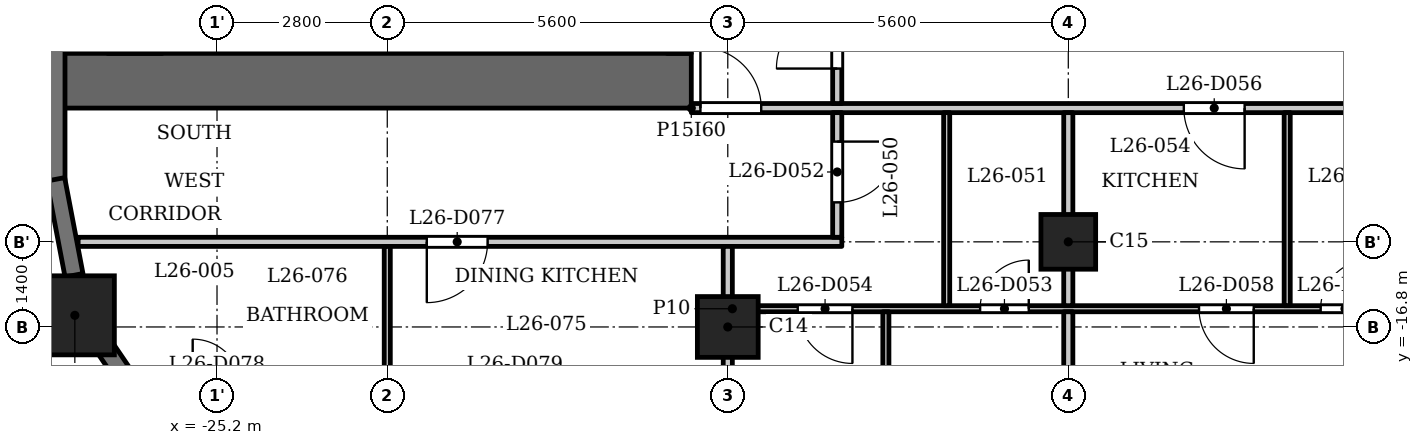
"""IFC4 building model, lengths in metres.
Left out: names, types, materials, properties, quantities, classifications, styles, units other than length and angle.
Written with IfcOpenShell. Run it as: python <this file> out.ifc"""

import sys

from ifc_helpers import new_model, si_unit, direction, frame, frame_2d, origin, origin_2d, place, context, subcontext, project, spatial, rectangle, extrude, element, fill, save


model = new_model("IFC4")
c1 = context("Model", 3, precision=1e-05, world=origin(), true_north=direction((0.0, 1.0)))
c2 = subcontext(c1, "Body", "Model", "MODEL_VIEW")
j1 = project(units=[si_unit("LENGTHUNIT", "METRE"), si_unit("PLANEANGLEUNIT", "RADIAN")], contexts=[c1])
p1 = place(None, origin())
s1 = spatial("IfcSite", under=j1, at=p1, CompositionType="ELEMENT")
p2 = place(p1, origin())
s2 = spatial("IfcBuilding", under=s1, at=p2, CompositionType="ELEMENT")
p3 = place(p2, frame((0.0, 0.0, 104.3)))
s3 = spatial("IfcBuildingStorey", under=s2, at=p3, CompositionType="ELEMENT", Elevation=104.3)
p4 = place(p3, frame((-27.538, -16.609, 0.0), z_axis=(0.0, 0.0, 1.0), x_axis=(1.0, 0.0, 0.0)))
e1 = element("IfcColumn", 1, at=p4, inside=s3, PredefinedType="COLUMN", context=c2, shape_type="SweptSolid", body=[
    extrude(rectangle(XDim=1.3, YDim=1.3, at=origin_2d()), origin(), (0.0, 0.0, 1.0), 3.5),
])
p5 = place(p3, frame((-16.8, -16.8, 0.0), z_axis=(0.0, 0.0, 1.0), x_axis=(1.0, 0.0, 0.0)))
e2 = element("IfcColumn", 2, at=p5, inside=s3, PredefinedType="COLUMN", context=c2, shape_type="SweptSolid", body=[
    extrude(rectangle(XDim=1.0, YDim=1.0, at=origin_2d()), origin(), (0.0, 0.0, 1.0), 3.5),
])
p6 = place(p3, frame((-11.2, -15.4, 0.0), z_axis=(0.0, 0.0, 1.0), x_axis=(1.0, 0.0, 0.0)))
e3 = element("IfcColumn", 3, at=p6, inside=s3, PredefinedType="COLUMN", context=c2, shape_type="SweptSolid", body=[
    extrude(rectangle(XDim=0.9, YDim=0.9, at=origin_2d()), origin(), (0.0, 0.0, 1.0), 3.5),
])
p7 = place(p3, frame((-27.85, -11.85, 0.0), z_axis=(0.0, 0.0, 1.0), x_axis=(0.0, -1.0, 0.0)))
e4 = element("IfcWall", 4, at=p7, inside=s3, PredefinedType="SOLIDWALL", context=c2, shape_type="SweptSolid", body=[
    extrude(rectangle(XDim=2.55, YDim=0.3, at=frame_2d((1.275, 0.0))), origin(), (0.0, 0.0, 1.0), 2.4),
])
for number, where, z_axis, x_axis in (
    (5, (-27.853, -14.372, 0.0), (0.0, 0.0, 1.0), (0.187, -0.982, 0.0)),
    (6, (-27.082, -17.084, 0.0), (0.0, 0.0, 1.0), (0.562, -0.827, 0.0)),
):
    element("IfcWall", number, at=place(p3, frame(where, z_axis=z_axis, x_axis=x_axis)), inside=s3, PredefinedType="SOLIDWALL", context=c2, shape_type="SweptSolid", body=[
        extrude(rectangle(XDim=1.606, YDim=0.3, at=frame_2d((0.803, 0.0))), origin(), (0.0, 0.0, 1.0), 2.4),
    ])
p8 = place(p3, frame((-17.4, -12.75, 0.0), z_axis=(0.0, 0.0, 1.0), x_axis=(-1.0, 0.0, 0.0)))
e7 = element("IfcWall", 7, at=p8, inside=s3, PredefinedType="SHEAR", context=c2, shape_type="SweptSolid", body=[
    extrude(rectangle(XDim=10.4, YDim=0.9, at=frame_2d((5.2, 0.0))), origin(), (0.0, 0.0, 1.0), 3.2),
])
p9 = place(p3, frame((-17.6, -12.3, 0.0), z_axis=(0.0, 0.0, 1.0), x_axis=(0.0, 1.0, 0.0)))
e8 = element("IfcWall", 8, at=p9, inside=s3, PredefinedType="SHEAR", context=c2, shape_type="SweptSolid", body=[
    extrude(rectangle(XDim=24.6, YDim=0.4, at=frame_2d((12.3, 0.0))), origin(), (0.0, 0.0, 1.0), 3.2),
])
p10 = place(p9, frame((6.0, 0.0, 0.0)))
e9 = element("IfcOpeningElement", 9, at=p10, cuts=e8, PredefinedType="OPENING", context=c2, shape_type="SweptSolid", body=[
    extrude(rectangle(XDim=1.1, YDim=2.1, at=frame_2d((0.55, 1.05))), frame((0.0, 0.21, 0.0), z_axis=(0.0, -1.0, 0.0), x_axis=(1.0, 0.0, 0.0)), (0.0, 0.0, 1.0), 0.42),
])
p11 = place(p9, frame((8.4, 0.0, 0.0)))
e10 = element("IfcOpeningElement", 10, at=p11, cuts=e8, PredefinedType="OPENING", context=c2, shape_type="SweptSolid", body=[
    extrude(rectangle(XDim=1.1, YDim=2.1, at=frame_2d((0.55, 1.05))), frame((0.0, 0.21, 0.0), z_axis=(0.0, -1.0, 0.0), x_axis=(1.0, 0.0, 0.0)), (0.0, 0.0, 1.0), 0.42),
])
p12 = place(p9, frame((10.8, 0.0, 0.0)))
e11 = element("IfcOpeningElement", 11, at=p12, cuts=e8, PredefinedType="OPENING", context=c2, shape_type="SweptSolid", body=[
    extrude(rectangle(XDim=1.1, YDim=2.1, at=frame_2d((0.55, 1.05))), frame((0.0, 0.21, 0.0), z_axis=(0.0, -1.0, 0.0), x_axis=(1.0, 0.0, 0.0)), (0.0, 0.0, 1.0), 0.42),
])
p13 = place(p9, frame((16.75, 0.0, 0.0)))
e12 = element("IfcOpeningElement", 12, at=p13, cuts=e8, PredefinedType="OPENING", context=c2, shape_type="SweptSolid", body=[
    extrude(rectangle(XDim=0.9, YDim=2.1, at=frame_2d((0.45, 1.05))), frame((0.0, 0.21, 0.0), z_axis=(0.0, -1.0, 0.0), x_axis=(1.0, 0.0, 0.0)), (0.0, 0.0, 1.0), 0.42),
])
p14 = place(p9, frame((22.8, 0.0, 0.0)))
e13 = element("IfcOpeningElement", 13, at=p14, cuts=e8, PredefinedType="OPENING", context=c2, shape_type="SweptSolid", body=[
    extrude(rectangle(XDim=1.1, YDim=2.1, at=frame_2d((0.55, 1.05))), frame((0.0, 0.21, 0.0), z_axis=(0.0, -1.0, 0.0), x_axis=(1.0, 0.0, 0.0)), (0.0, 0.0, 1.0), 0.42),
])
p15 = place(p9, frame((0.7, 0.0, 0.0)))
e14 = element("IfcOpeningElement", 14, at=p15, cuts=e8, PredefinedType="OPENING", context=c2, shape_type="SweptSolid", body=[
    extrude(rectangle(XDim=1.1, YDim=2.1, at=frame_2d((0.55, 1.05))), frame((0.0, 0.21, 0.0), z_axis=(0.0, -1.0, 0.0), x_axis=(1.0, 0.0, 0.0)), (0.0, 0.0, 1.0), 0.42),
])
p16 = place(p9, frame((12.775, 0.0, 0.0)))
e15 = element("IfcOpeningElement", 15, at=p16, cuts=e8, PredefinedType="OPENING", context=c2, shape_type="SweptSolid", body=[
    extrude(rectangle(XDim=1.8, YDim=2.1, at=frame_2d((0.9, 1.05))), frame((0.0, 0.21, 0.0), z_axis=(0.0, -1.0, 0.0), x_axis=(1.0, 0.0, 0.0)), (0.0, 0.0, 1.0), 0.42),
])
p17 = place(p3, frame((-26.55, -12.3, 0.0), z_axis=(0.0, 0.0, 1.0), x_axis=(0.0, 1.0, 0.0)))
e16 = element("IfcWall", 16, at=p17, inside=s3, PredefinedType="SHEAR", context=c2, shape_type="SweptSolid", body=[
    extrude(rectangle(XDim=24.6, YDim=0.9, at=frame_2d((12.3, 0.0))), origin(), (0.0, 0.0, 1.0), 3.2),
])
p18 = place(p3, frame((-23.55, -12.3, 0.0), z_axis=(0.0, 0.0, 1.0), x_axis=(0.0, 1.0, 0.0)))
e17 = element("IfcWall", 17, at=p18, inside=s3, PredefinedType="PARTITIONING", context=c2, shape_type="SweptSolid", body=[
    extrude(rectangle(XDim=2.5, YDim=0.2, at=frame_2d((1.25, 0.0))), origin(), (0.0, 0.0, 1.0), 3.2),
])
p19 = place(p18, frame((0.8, 0.0, 0.0)))
e18 = element("IfcOpeningElement", 18, at=p19, cuts=e17, PredefinedType="OPENING", context=c2, shape_type="SweptSolid", body=[
    extrude(rectangle(XDim=0.9, YDim=2.1, at=frame_2d((0.45, 1.05))), frame((0.0, 0.11, 0.0), z_axis=(0.0, -1.0, 0.0), x_axis=(1.0, 0.0, 0.0)), (0.0, 0.0, 1.0), 0.22),
])
p20 = place(p3, frame((-16.725, -16.5, 0.0), z_axis=(0.0, 0.0, 1.0), x_axis=(1.0, 0.0, 0.0)))
e19 = element("IfcWall", 19, at=p20, inside=s3, PredefinedType="PARTITIONING", context=c2, shape_type="SweptSolid", body=[
    extrude(rectangle(XDim=33.45, YDim=0.1, at=frame_2d((16.725, 0.0))), origin(), (0.0, 0.0, 1.0), 3.2),
])
p21 = place(p20, frame((4.075, 0.0, 0.0)))
e20 = element("IfcOpeningElement", 20, at=p21, cuts=e19, PredefinedType="OPENING", context=c2, shape_type="SweptSolid", body=[
    extrude(rectangle(XDim=0.8, YDim=2.1, at=frame_2d((0.4, 1.05))), frame((0.0, 0.06, 0.0), z_axis=(0.0, -1.0, 0.0), x_axis=(1.0, 0.0, 0.0)), (0.0, 0.0, 1.0), 0.12),
])
p22 = place(p20, frame((1.075, 0.0, 0.0)))
e21 = element("IfcOpeningElement", 21, at=p22, cuts=e19, PredefinedType="OPENING", context=c2, shape_type="SweptSolid", body=[
    extrude(rectangle(XDim=0.9, YDim=2.1, at=frame_2d((0.45, 1.05))), frame((0.0, 0.06, 0.0), z_axis=(0.0, -1.0, 0.0), x_axis=(1.0, 0.0, 0.0)), (0.0, 0.0, 1.0), 0.12),
])
p23 = place(p20, frame((9.675, 0.0, 0.0)))
e22 = element("IfcOpeningElement", 22, at=p23, cuts=e19, PredefinedType="OPENING", context=c2, shape_type="SweptSolid", body=[
    extrude(rectangle(XDim=0.8, YDim=2.1, at=frame_2d((0.4, 1.05))), frame((0.0, 0.06, 0.0), z_axis=(0.0, -1.0, 0.0), x_axis=(1.0, 0.0, 0.0)), (0.0, 0.0, 1.0), 0.12),
])
p24 = place(p20, frame((7.675, 0.0, 0.0)))
e23 = element("IfcOpeningElement", 23, at=p24, cuts=e19, PredefinedType="OPENING", context=c2, shape_type="SweptSolid", body=[
    extrude(rectangle(XDim=0.9, YDim=2.1, at=frame_2d((0.45, 1.05))), frame((0.0, 0.06, 0.0), z_axis=(0.0, -1.0, 0.0), x_axis=(1.0, 0.0, 0.0)), (0.0, 0.0, 1.0), 0.12),
])
p25 = place(p20, frame((15.275, 0.0, 0.0)))
e24 = element("IfcOpeningElement", 24, at=p25, cuts=e19, PredefinedType="OPENING", context=c2, shape_type="SweptSolid", body=[
    extrude(rectangle(XDim=0.8, YDim=2.1, at=frame_2d((0.4, 1.05))), frame((0.0, 0.06, 0.0), z_axis=(0.0, -1.0, 0.0), x_axis=(1.0, 0.0, 0.0)), (0.0, 0.0, 1.0), 0.12),
])
p26 = place(p20, frame((11.775, 0.0, 0.0)))
e25 = element("IfcOpeningElement", 25, at=p26, cuts=e19, PredefinedType="OPENING", context=c2, shape_type="SweptSolid", body=[
    extrude(rectangle(XDim=0.9, YDim=2.1, at=frame_2d((0.45, 1.05))), frame((0.0, 0.06, 0.0), z_axis=(0.0, -1.0, 0.0), x_axis=(1.0, 0.0, 0.0)), (0.0, 0.0, 1.0), 0.12),
])
p27 = place(p20, frame((20.625, 0.0, 0.0)))
e26 = element("IfcOpeningElement", 26, at=p27, cuts=e19, PredefinedType="OPENING", context=c2, shape_type="SweptSolid", body=[
    extrude(rectangle(XDim=0.8, YDim=2.1, at=frame_2d((0.4, 1.05))), frame((0.0, 0.06, 0.0), z_axis=(0.0, -1.0, 0.0), x_axis=(1.0, 0.0, 0.0)), (0.0, 0.0, 1.0), 0.12),
])
p28 = place(p20, frame((18.375, 0.0, 0.0)))
e27 = element("IfcOpeningElement", 27, at=p28, cuts=e19, PredefinedType="OPENING", context=c2, shape_type="SweptSolid", body=[
    extrude(rectangle(XDim=0.9, YDim=2.1, at=frame_2d((0.45, 1.05))), frame((0.0, 0.06, 0.0), z_axis=(0.0, -1.0, 0.0), x_axis=(1.0, 0.0, 0.0)), (0.0, 0.0, 1.0), 0.12),
])
p29 = place(p20, frame((26.475, 0.0, 0.0)))
e28 = element("IfcOpeningElement", 28, at=p29, cuts=e19, PredefinedType="OPENING", context=c2, shape_type="SweptSolid", body=[
    extrude(rectangle(XDim=0.8, YDim=2.1, at=frame_2d((0.4, 1.05))), frame((0.0, 0.06, 0.0), z_axis=(0.0, -1.0, 0.0), x_axis=(1.0, 0.0, 0.0)), (0.0, 0.0, 1.0), 0.12),
])
p30 = place(p20, frame((23.225, 0.0, 0.0)))
e29 = element("IfcOpeningElement", 29, at=p30, cuts=e19, PredefinedType="OPENING", context=c2, shape_type="SweptSolid", body=[
    extrude(rectangle(XDim=0.9, YDim=2.1, at=frame_2d((0.45, 1.05))), frame((0.0, 0.06, 0.0), z_axis=(0.0, -1.0, 0.0), x_axis=(1.0, 0.0, 0.0)), (0.0, 0.0, 1.0), 0.12),
])
p31 = place(p20, frame((29.475, 0.0, 0.0)))
e30 = element("IfcOpeningElement", 30, at=p31, cuts=e19, PredefinedType="OPENING", context=c2, shape_type="SweptSolid", body=[
    extrude(rectangle(XDim=0.8, YDim=2.1, at=frame_2d((0.4, 1.05))), frame((0.0, 0.06, 0.0), z_axis=(0.0, -1.0, 0.0), x_axis=(1.0, 0.0, 0.0)), (0.0, 0.0, 1.0), 0.12),
])
p32 = place(p20, frame((31.825, 0.0, 0.0)))
e31 = element("IfcOpeningElement", 31, at=p32, cuts=e19, PredefinedType="OPENING", context=c2, shape_type="SweptSolid", body=[
    extrude(rectangle(XDim=0.9, YDim=2.1, at=frame_2d((0.45, 1.05))), frame((0.0, 0.06, 0.0), z_axis=(0.0, -1.0, 0.0), x_axis=(1.0, 0.0, 0.0)), (0.0, 0.0, 1.0), 0.12),
])
p33 = place(p3, frame((-27.484, -15.4, 0.0), z_axis=(0.0, 0.0, 1.0), x_axis=(1.0, 0.0, 0.0)))
e32 = element("IfcWall", 32, at=p33, inside=s3, PredefinedType="PARTITIONING", context=c2, shape_type="SweptSolid", body=[
    extrude(rectangle(XDim=12.559, YDim=0.15, at=frame_2d((6.279, 0.0))), origin(), (0.0, 0.0, 1.0), 3.2),
])
p34 = place(p33, frame((5.734, 0.0, 0.0)))
e33 = element("IfcOpeningElement", 33, at=p34, cuts=e32, PredefinedType="OPENING", context=c2, shape_type="SweptSolid", body=[
    extrude(rectangle(XDim=1.0, YDim=2.1, at=frame_2d((0.5, 1.05))), frame((0.0, 0.085, 0.0), z_axis=(0.0, -1.0, 0.0), x_axis=(1.0, 0.0, 0.0)), (0.0, 0.0, 1.0), 0.17),
])
p35 = place(p3, frame((-17.4, -13.2, 0.0), z_axis=(0.0, 0.0, 1.0), x_axis=(1.0, 0.0, 0.0)))
e34 = element("IfcWall", 34, at=p35, inside=s3, PredefinedType="PARTITIONING", context=c2, shape_type="SweptSolid", body=[
    extrude(rectangle(XDim=34.8, YDim=0.15, at=frame_2d((17.4, 0.0))), origin(), (0.0, 0.0, 1.0), 3.2),
])
p36 = place(p35, frame((0.15, 0.0, 0.0)))
e35 = element("IfcOpeningElement", 35, at=p36, cuts=e34, PredefinedType="OPENING", context=c2, shape_type="SweptSolid", body=[
    extrude(rectangle(XDim=1.0, YDim=2.1, at=frame_2d((0.5, 1.05))), frame((0.0, 0.085, 0.0), z_axis=(0.0, -1.0, 0.0), x_axis=(1.0, 0.0, 0.0)), (0.0, 0.0, 1.0), 0.17),
])
p37 = place(p35, frame((33.55, 0.0, 0.0)))
e36 = element("IfcOpeningElement", 36, at=p37, cuts=e34, PredefinedType="OPENING", context=c2, shape_type="SweptSolid", body=[
    extrude(rectangle(XDim=1.0, YDim=2.1, at=frame_2d((0.5, 1.05))), frame((0.0, 0.085, 0.0), z_axis=(0.0, -1.0, 0.0), x_axis=(1.0, 0.0, 0.0)), (0.0, 0.0, 1.0), 0.17),
])
p38 = place(p35, frame((8.1, 0.0, 0.0)))
e37 = element("IfcOpeningElement", 37, at=p38, cuts=e34, PredefinedType="OPENING", context=c2, shape_type="SweptSolid", body=[
    extrude(rectangle(XDim=1.0, YDim=2.1, at=frame_2d((0.5, 1.05))), frame((0.0, 0.085, 0.0), z_axis=(0.0, -1.0, 0.0), x_axis=(1.0, 0.0, 0.0)), (0.0, 0.0, 1.0), 0.17),
])
p39 = place(p35, frame((12.45, 0.0, 0.0)))
e38 = element("IfcOpeningElement", 38, at=p39, cuts=e34, PredefinedType="OPENING", context=c2, shape_type="SweptSolid", body=[
    extrude(rectangle(XDim=1.0, YDim=2.1, at=frame_2d((0.5, 1.05))), frame((0.0, 0.085, 0.0), z_axis=(0.0, -1.0, 0.0), x_axis=(1.0, 0.0, 0.0)), (0.0, 0.0, 1.0), 0.17),
])
p40 = place(p35, frame((19.05, 0.0, 0.0)))
e39 = element("IfcOpeningElement", 39, at=p40, cuts=e34, PredefinedType="OPENING", context=c2, shape_type="SweptSolid", body=[
    extrude(rectangle(XDim=1.0, YDim=2.1, at=frame_2d((0.5, 1.05))), frame((0.0, 0.085, 0.0), z_axis=(0.0, -1.0, 0.0), x_axis=(1.0, 0.0, 0.0)), (0.0, 0.0, 1.0), 0.17),
])
p41 = place(p35, frame((24.9, 0.0, 0.0)))
e40 = element("IfcOpeningElement", 40, at=p41, cuts=e34, PredefinedType="OPENING", context=c2, shape_type="SweptSolid", body=[
    extrude(rectangle(XDim=1.0, YDim=2.1, at=frame_2d((0.5, 1.05))), frame((0.0, 0.085, 0.0), z_axis=(0.0, -1.0, 0.0), x_axis=(1.0, 0.0, 0.0)), (0.0, 0.0, 1.0), 0.17),
])
p42 = place(p3, frame((-22.4, -17.75, 0.0), z_axis=(0.0, 0.0, 1.0), x_axis=(0.0, 1.0, 0.0)))
e41 = element("IfcWall", 41, at=p42, inside=s3, PredefinedType="PARTITIONING", context=c2, shape_type="SweptSolid", body=[
    extrude(rectangle(XDim=2.275, YDim=0.1, at=frame_2d((1.137, 0.0))), origin(), (0.0, 0.0, 1.0), 3.2),
])
p43 = place(p3, frame((-16.8, -23.03, 0.0), z_axis=(0.0, 0.0, 1.0), x_axis=(0.0, 1.0, 0.0)))
e42 = element("IfcWall", 42, at=p43, inside=s3, PredefinedType="PARTITIONING", context=c2, shape_type="SweptSolid", body=[
    extrude(rectangle(XDim=7.555, YDim=0.15, at=frame_2d((3.777, 0.0))), origin(), (0.0, 0.0, 1.0), 3.2),
])
p44 = place(p3, frame((-15.0, -15.325, 0.0), z_axis=(0.0, 0.0, 1.0), x_axis=(0.0, 1.0, 0.0)))
e43 = element("IfcWall", 43, at=p44, inside=s3, PredefinedType="PARTITIONING", context=c2, shape_type="SweptSolid", body=[
    extrude(rectangle(XDim=2.05, YDim=0.15, at=frame_2d((1.025, 0.0))), origin(), (0.0, 0.0, 1.0), 3.2),
])
p45 = place(p44, frame((0.574, 0.0, 0.0)))
e44 = element("IfcOpeningElement", 44, at=p45, cuts=e43, PredefinedType="OPENING", context=c2, shape_type="SweptSolid", body=[
    extrude(rectangle(XDim=1.0, YDim=2.1, at=frame_2d((0.5, 1.05))), frame((0.0, 0.085, 0.0), z_axis=(0.0, -1.0, 0.0), x_axis=(1.0, 0.0, 0.0)), (0.0, 0.0, 1.0), 0.17),
])
p46 = place(p3, frame((-15.0, -13.125, 0.0), z_axis=(0.0, 0.0, 1.0), x_axis=(0.0, 1.0, 0.0)))
e45 = element("IfcWall", 45, at=p46, inside=s3, PredefinedType="PARTITIONING", context=c2, shape_type="SweptSolid", body=[
    extrude(rectangle(XDim=6.356, YDim=0.15, at=frame_2d((3.178, 0.0))), origin(), (0.0, 0.0, 1.0), 3.2),
])
p47 = place(p46, frame((0.575, 0.0, 0.0)))
e46 = element("IfcOpeningElement", 46, at=p47, cuts=e45, PredefinedType="OPENING", context=c2, shape_type="SweptSolid", body=[
    extrude(rectangle(XDim=1.0, YDim=2.1, at=frame_2d((0.5, 1.05))), frame((0.0, 0.085, 0.0), z_axis=(0.0, -1.0, 0.0), x_axis=(1.0, 0.0, 0.0)), (0.0, 0.0, 1.0), 0.17),
])
p48 = place(p3, frame((-14.2, -22.08, 0.0), z_axis=(0.0, 0.0, 1.0), x_axis=(0.0, 1.0, 0.0)))
e47 = element("IfcWall", 47, at=p48, inside=s3, PredefinedType="PARTITIONING", context=c2, shape_type="SweptSolid", body=[
    extrude(rectangle(XDim=5.53, YDim=0.1, at=frame_2d((2.765, 0.0))), origin(), (0.0, 0.0, 1.0), 3.2),
])
p49 = place(p48, frame((0.42, 0.0, 0.0)))
e48 = element("IfcOpeningElement", 48, at=p49, cuts=e47, PredefinedType="OPENING", context=c2, shape_type="SweptSolid", body=[
    extrude(rectangle(XDim=0.9, YDim=2.1, at=frame_2d((0.45, 1.05))), frame((0.0, 0.06, 0.0), z_axis=(0.0, -1.0, 0.0), x_axis=(1.0, 0.0, 0.0)), (0.0, 0.0, 1.0), 0.12),
])
p50 = place(p3, frame((-13.2, -16.45, 0.0), z_axis=(0.0, 0.0, 1.0), x_axis=(0.0, 1.0, 0.0)))
e49 = element("IfcWall", 49, at=p50, inside=s3, PredefinedType="PARTITIONING", context=c2, shape_type="SweptSolid", body=[
    extrude(rectangle(XDim=3.175, YDim=0.1, at=frame_2d((1.587, 0.0))), origin(), (0.0, 0.0, 1.0), 3.2),
])
p51 = place(p3, frame((-11.2, -23.03, 0.0), z_axis=(0.0, 0.0, 1.0), x_axis=(0.0, 1.0, 0.0)))
e50 = element("IfcWall", 50, at=p51, inside=s3, PredefinedType="PARTITIONING", context=c2, shape_type="SweptSolid", body=[
    extrude(rectangle(XDim=6.48, YDim=0.15, at=frame_2d((3.24, 0.0))), origin(), (0.0, 0.0, 1.0), 3.2),
])
p52 = place(p3, frame((-11.2, -16.45, 0.0), z_axis=(0.0, 0.0, 1.0), x_axis=(0.0, 1.0, 0.0)))
e51 = element("IfcWall", 51, at=p52, inside=s3, PredefinedType="PARTITIONING", context=c2, shape_type="SweptSolid", body=[
    extrude(rectangle(XDim=3.175, YDim=0.15, at=frame_2d((1.587, 0.0))), origin(), (0.0, 0.0, 1.0), 3.2),
])
p53 = place(p3, frame((-7.6, -16.45, 0.0), z_axis=(0.0, 0.0, 1.0), x_axis=(0.0, 1.0, 0.0)))
e52 = element("IfcWall", 52, at=p53, inside=s3, PredefinedType="PARTITIONING", context=c2, shape_type="SweptSolid", body=[
    extrude(rectangle(XDim=3.175, YDim=0.1, at=frame_2d((1.587, 0.0))), origin(), (0.0, 0.0, 1.0), 3.2),
])
p54 = place(p47, origin())
e53 = element("IfcDoor", 53, at=p54, inside=s3, OperationType="SINGLE_SWING_RIGHT", PredefinedType="DOOR", context=c2, shape_type="SweptSolid", body=[
    extrude(rectangle(XDim=1.0, YDim=2.1, at=frame_2d((0.5, 1.05))), frame((0.0, 0.025, 0.0), z_axis=(0.0, -1.0, 0.0), x_axis=(1.0, 0.0, 0.0)), (0.0, 0.0, 1.0), 0.05),
])
fill(e46, e53)
p55 = place(p36, origin())
e54 = element("IfcDoor", 54, at=p55, inside=s3, OperationType="SINGLE_SWING_RIGHT", PredefinedType="DOOR", context=c2, shape_type="SweptSolid", body=[
    extrude(rectangle(XDim=1.0, YDim=2.1, at=frame_2d((0.5, 1.05))), frame((0.0, 0.025, 0.0), z_axis=(0.0, -1.0, 0.0), x_axis=(1.0, 0.0, 0.0)), (0.0, 0.0, 1.0), 0.05),
])
fill(e35, e54)
p56 = place(p45, origin())
e55 = element("IfcDoor", 55, at=p56, inside=s3, OperationType="SINGLE_SWING_RIGHT", PredefinedType="DOOR", context=c2, shape_type="SweptSolid", body=[
    extrude(rectangle(XDim=1.0, YDim=2.1, at=frame_2d((0.5, 1.05))), frame((0.0, 0.025, 0.0), z_axis=(0.0, -1.0, 0.0), x_axis=(1.0, 0.0, 0.0)), (0.0, 0.0, 1.0), 0.05),
])
fill(e44, e55)
p57 = place(p21, origin())
e56 = element("IfcDoor", 56, at=p57, inside=s3, OperationType="SINGLE_SWING_LEFT", PredefinedType="DOOR", context=c2, shape_type="SweptSolid", body=[
    extrude(rectangle(XDim=0.8, YDim=2.1, at=frame_2d((0.4, 1.05))), frame((0.0, 0.025, 0.0), z_axis=(0.0, -1.0, 0.0), x_axis=(1.0, 0.0, 0.0)), (0.0, 0.0, 1.0), 0.05),
])
fill(e20, e56)
p58 = place(p22, origin())
e57 = element("IfcDoor", 57, at=p58, inside=s3, OperationType="SINGLE_SWING_RIGHT", PredefinedType="DOOR", context=c2, shape_type="SweptSolid", body=[
    extrude(rectangle(XDim=0.9, YDim=2.1, at=frame_2d((0.45, 1.05))), frame((0.0, 0.025, 0.0), z_axis=(0.0, -1.0, 0.0), x_axis=(1.0, 0.0, 0.0)), (0.0, 0.0, 1.0), 0.05),
])
fill(e21, e57)
p59 = place(p38, origin())
e58 = element("IfcDoor", 58, at=p59, inside=s3, OperationType="SINGLE_SWING_RIGHT", PredefinedType="DOOR", context=c2, shape_type="SweptSolid", body=[
    extrude(rectangle(XDim=1.0, YDim=2.1, at=frame_2d((0.5, 1.05))), frame((0.0, 0.025, 0.0), z_axis=(0.0, -1.0, 0.0), x_axis=(1.0, 0.0, 0.0)), (0.0, 0.0, 1.0), 0.05),
])
fill(e37, e58)
p60 = place(p23, origin())
e59 = element("IfcDoor", 59, at=p60, inside=s3, OperationType="SINGLE_SWING_LEFT", PredefinedType="DOOR", context=c2, shape_type="SweptSolid", body=[
    extrude(rectangle(XDim=0.8, YDim=2.1, at=frame_2d((0.4, 1.05))), frame((0.0, 0.025, 0.0), z_axis=(0.0, -1.0, 0.0), x_axis=(1.0, 0.0, 0.0)), (0.0, 0.0, 1.0), 0.05),
])
fill(e22, e59)
p61 = place(p24, origin())
e60 = element("IfcDoor", 60, at=p61, inside=s3, OperationType="SINGLE_SWING_RIGHT", PredefinedType="DOOR", context=c2, shape_type="SweptSolid", body=[
    extrude(rectangle(XDim=0.9, YDim=2.1, at=frame_2d((0.45, 1.05))), frame((0.0, 0.025, 0.0), z_axis=(0.0, -1.0, 0.0), x_axis=(1.0, 0.0, 0.0)), (0.0, 0.0, 1.0), 0.05),
])
fill(e23, e60)
p62 = place(p34, origin())
e61 = element("IfcDoor", 61, at=p62, inside=s3, OperationType="SINGLE_SWING_LEFT", PredefinedType="DOOR", context=c2, shape_type="SweptSolid", body=[
    extrude(rectangle(XDim=1.0, YDim=2.1, at=frame_2d((0.5, 1.05))), frame((0.0, 0.025, 0.0), z_axis=(0.0, -1.0, 0.0), x_axis=(1.0, 0.0, 0.0)), (0.0, 0.0, 1.0), 0.05),
])
fill(e33, e61)
save(model, sys.argv[1])
